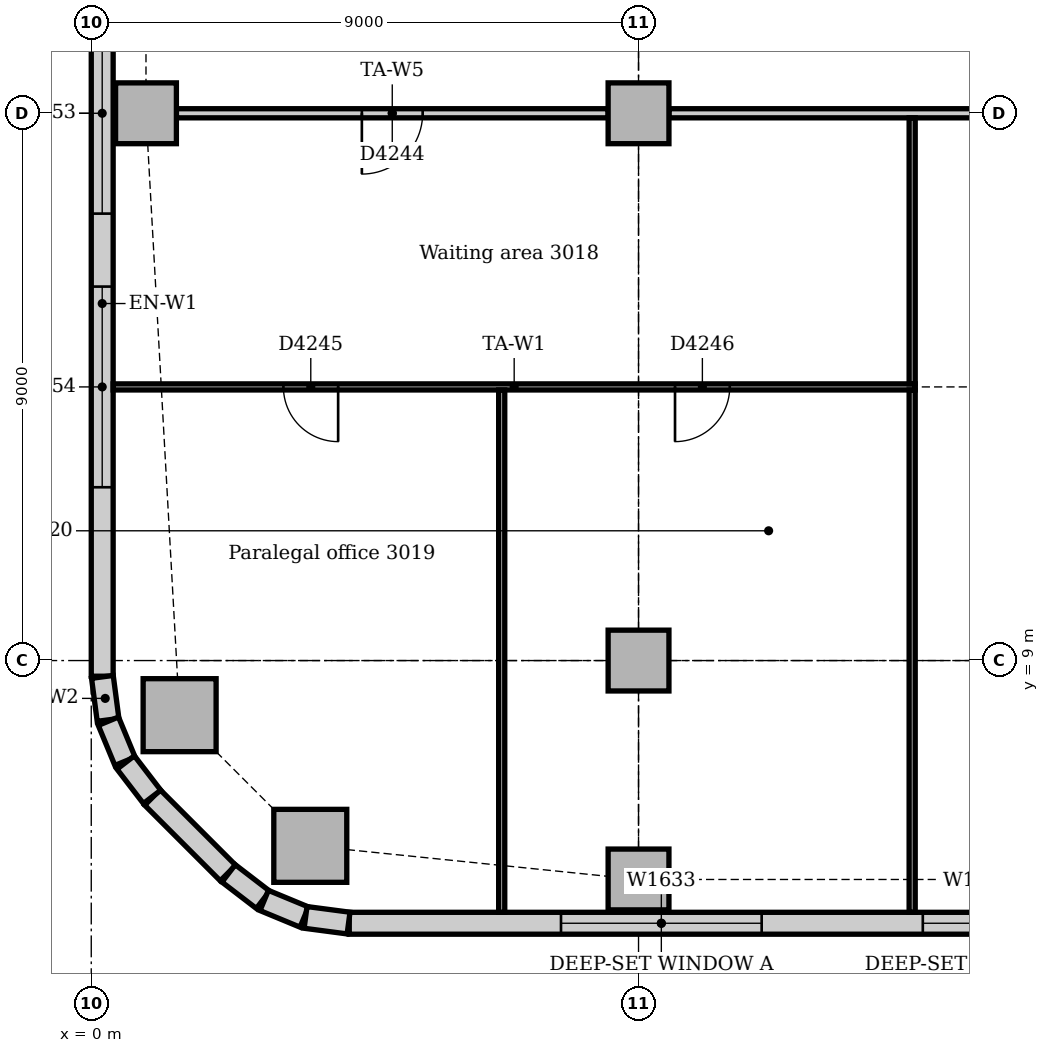
"""IFC4 building model, lengths in metres.
Left out: names, types, materials, properties, quantities, classifications, styles, units other than length and angle.
Written with IfcOpenShell. Run it as: python <this file> out.ifc"""

import sys

from ifc_helpers import new_model, si_unit, direction, frame, frame_2d, origin, origin_2d, place, context, subcontext, project, spatial, rectangle, extrude, element, fill, save


model = new_model("IFC4")
c1 = context("Model", 3, precision=1e-05, world=origin(), true_north=direction((0.0, 1.0)))
c2 = subcontext(c1, "Body", "Model", "MODEL_VIEW")
j1 = project(units=[si_unit("LENGTHUNIT", "METRE"), si_unit("PLANEANGLEUNIT", "RADIAN")], contexts=[c1])
p1 = place(None, origin())
s1 = spatial("IfcSite", under=j1, at=p1, CompositionType="ELEMENT")
p2 = place(p1, origin())
s2 = spatial("IfcBuilding", under=s1, at=p2, CompositionType="ELEMENT")
p3 = place(p2, frame((0.0, 0.0, 128.0)))
s3 = spatial("IfcBuildingStorey", under=s2, at=p3, CompositionType="ELEMENT", Elevation=128.0)
for number, where, z_axis, x_axis in (
    (1, (3.602, 5.953, 0.0), (0.0, 0.0, 1.0), (1.0, 0.0, 0.0)),
    (2, (1.453, 8.102, 0.0), (0.0, 0.0, 1.0), (1.0, 0.0, 0.0)),
):
    element("IfcColumn", number, at=place(p3, frame(where, z_axis=z_axis, x_axis=x_axis)), inside=s3, PredefinedType="COLUMN", context=c2, shape_type="SweptSolid", body=[
        extrude(rectangle(XDim=1.2, YDim=1.2, at=origin_2d()), origin(), (0.0, 0.0, 1.0), 3.85),
    ])
for number, where, z_axis, x_axis in (
    (3, (9.0, 5.4, 0.0), (0.0, 0.0, 1.0), (1.0, 0.0, 0.0)),
    (4, (0.9, 18.0, 0.0), (0.0, 0.0, 1.0), (1.0, 0.0, 0.0)),
    (5, (9.0, 9.0, 0.0), (0.0, 0.0, 1.0), (1.0, 0.0, 0.0)),
    (6, (9.0, 18.0, 0.0), (0.0, 0.0, 1.0), (1.0, 0.0, 0.0)),
):
    element("IfcColumn", number, at=place(p3, frame(where, z_axis=z_axis, x_axis=x_axis)), inside=s3, PredefinedType="COLUMN", context=c2, shape_type="SweptSolid", body=[
        extrude(rectangle(XDim=1.0, YDim=1.0, at=origin_2d()), origin(), (0.0, 0.0, 1.0), 3.85),
    ])
p4 = place(p3, frame((4.243, 4.68, 0.0), z_axis=(0.0, 0.0, 1.0), x_axis=(1.0, 0.0, 0.0)))
e7 = element("IfcWall", 7, at=p4, inside=s3, PredefinedType="STANDARD", context=c2, shape_type="SweptSolid", body=[
    extrude(rectangle(XDim=37.265, YDim=0.36, at=frame_2d((18.632, 0.0))), origin(), (0.0, 0.0, 1.0), 3.85),
])
p5 = place(p4, frame((3.482, 0.0, 0.9)))
e8 = element("IfcOpeningElement", 8, at=p5, cuts=e7, PredefinedType="OPENING", context=c2, shape_type="SweptSolid", body=[
    extrude(rectangle(XDim=3.3, YDim=1.6, at=frame_2d((1.65, 0.8))), frame((0.0, 0.19, 0.0), z_axis=(0.0, -1.0, 0.0), x_axis=(1.0, 0.0, 0.0)), (0.0, 0.0, 1.0), 0.38),
])
p6 = place(p4, frame((9.432, 0.0, 0.9)))
e9 = element("IfcOpeningElement", 9, at=p6, cuts=e7, PredefinedType="OPENING", context=c2, shape_type="SweptSolid", body=[
    extrude(rectangle(XDim=1.8, YDim=1.6, at=frame_2d((0.9, 0.8))), frame((0.0, 0.19, 0.0), z_axis=(0.0, -1.0, 0.0), x_axis=(1.0, 0.0, 0.0)), (0.0, 0.0, 1.0), 0.38),
])
p7 = place(p4, frame((12.482, 0.0, 0.9)))
e10 = element("IfcOpeningElement", 10, at=p7, cuts=e7, PredefinedType="OPENING", context=c2, shape_type="SweptSolid", body=[
    extrude(rectangle(XDim=3.3, YDim=1.6, at=frame_2d((1.65, 0.8))), frame((0.0, 0.19, 0.0), z_axis=(0.0, -1.0, 0.0), x_axis=(1.0, 0.0, 0.0)), (0.0, 0.0, 1.0), 0.38),
])
p8 = place(p4, frame((18.432, 0.0, 0.9)))
e11 = element("IfcOpeningElement", 11, at=p8, cuts=e7, PredefinedType="OPENING", context=c2, shape_type="SweptSolid", body=[
    extrude(rectangle(XDim=1.8, YDim=1.6, at=frame_2d((0.9, 0.8))), frame((0.0, 0.19, 0.0), z_axis=(0.0, -1.0, 0.0), x_axis=(1.0, 0.0, 0.0)), (0.0, 0.0, 1.0), 0.38),
])
p9 = place(p4, frame((21.482, 0.0, 0.9)))
e12 = element("IfcOpeningElement", 12, at=p9, cuts=e7, PredefinedType="OPENING", context=c2, shape_type="SweptSolid", body=[
    extrude(rectangle(XDim=3.3, YDim=1.6, at=frame_2d((1.65, 0.8))), frame((0.0, 0.19, 0.0), z_axis=(0.0, -1.0, 0.0), x_axis=(1.0, 0.0, 0.0)), (0.0, 0.0, 1.0), 0.38),
])
p10 = place(p4, frame((25.982, 0.0, 0.9)))
e13 = element("IfcOpeningElement", 13, at=p10, cuts=e7, PredefinedType="OPENING", context=c2, shape_type="SweptSolid", body=[
    extrude(rectangle(XDim=3.3, YDim=1.6, at=frame_2d((1.65, 0.8))), frame((0.0, 0.19, 0.0), z_axis=(0.0, -1.0, 0.0), x_axis=(1.0, 0.0, 0.0)), (0.0, 0.0, 1.0), 0.38),
])
p11 = place(p4, frame((30.482, 0.0, 0.9)))
e14 = element("IfcOpeningElement", 14, at=p11, cuts=e7, PredefinedType="OPENING", context=c2, shape_type="SweptSolid", body=[
    extrude(rectangle(XDim=3.3, YDim=1.6, at=frame_2d((1.65, 0.8))), frame((0.0, 0.19, 0.0), z_axis=(0.0, -1.0, 0.0), x_axis=(1.0, 0.0, 0.0)), (0.0, 0.0, 1.0), 0.38),
])
p12 = place(p3, frame((0.18, 21.0, 0.0), z_axis=(0.0, 0.0, 1.0), x_axis=(0.0, -1.0, 0.0)))
e15 = element("IfcWall", 15, at=p12, inside=s3, PredefinedType="STANDARD", context=c2, shape_type="SweptSolid", body=[
    extrude(rectangle(XDim=12.257, YDim=0.36, at=frame_2d((6.129, 0.0))), origin(), (0.0, 0.0, 1.0), 3.85),
])
p13 = place(p12, frame((1.35, 0.0, 0.9)))
e16 = element("IfcOpeningElement", 16, at=p13, cuts=e15, PredefinedType="OPENING", context=c2, shape_type="SweptSolid", body=[
    extrude(rectangle(XDim=3.3, YDim=1.6, at=frame_2d((1.65, 0.8))), frame((0.0, 0.19, 0.0), z_axis=(0.0, -1.0, 0.0), x_axis=(1.0, 0.0, 0.0)), (0.0, 0.0, 1.0), 0.38),
])
p14 = place(p12, frame((5.85, 0.0, 0.9)))
e17 = element("IfcOpeningElement", 17, at=p14, cuts=e15, PredefinedType="OPENING", context=c2, shape_type="SweptSolid", body=[
    extrude(rectangle(XDim=3.3, YDim=1.6, at=frame_2d((1.65, 0.8))), frame((0.0, 0.19, 0.0), z_axis=(0.0, -1.0, 0.0), x_axis=(1.0, 0.0, 0.0)), (0.0, 0.0, 1.0), 0.38),
])
p15 = place(p3, frame((1.006, 6.749, 0.0), z_axis=(0.0, 0.0, 1.0), x_axis=(0.707106781187, -0.707106781187, 0.0)))
e18 = element("IfcWall", 18, at=p15, inside=s3, PredefinedType="STANDARD", context=c2, shape_type="SweptSolid", body=[
    extrude(rectangle(XDim=1.757, YDim=0.36, at=frame_2d((0.879, 0.0))), origin(), (0.0, 0.0, 1.0), 3.85),
])
for number, where, z_axis, x_axis in (
    (19, (0.183, 8.731, 0.0), (0.0, 0.0, 1.0), (0.131, -0.991, 0.0)),
    (20, (0.282, 8.003, 0.0), (0.0, 0.0, 1.0), (0.383, -0.924, 0.0)),
):
    element("IfcWall", number, at=place(p3, frame(where, z_axis=z_axis, x_axis=x_axis)), inside=s3, PredefinedType="STANDARD", context=c2, shape_type="SweptSolid", body=[
        extrude(rectangle(XDim=0.713, YDim=0.36, at=frame_2d((0.356, 0.0))), origin(), (0.0, 0.0, 1.0), 3.85),
    ])
for number, where, z_axis, x_axis in (
    (21, (0.566, 7.324, 0.0), (0.0, 0.0, 1.0), (0.609, -0.793, 0.0)),
    (22, (2.259, 5.5, 0.0), (0.0, 0.0, 1.0), (0.793, -0.609, 0.0)),
):
    element("IfcWall", number, at=place(p3, frame(where, z_axis=z_axis, x_axis=x_axis)), inside=s3, PredefinedType="STANDARD", context=c2, shape_type="SweptSolid", body=[
        extrude(rectangle(XDim=0.713, YDim=0.36, at=frame_2d((0.357, 0.0))), origin(), (0.0, 0.0, 1.0), 3.85),
    ])
for number, where, z_axis, x_axis in (
    (23, (2.844, 5.055, 0.0), (0.0, 0.0, 1.0), (0.924, -0.383, 0.0)),
    (24, (3.524, 4.776, 0.0), (0.0, 0.0, 1.0), (0.991, -0.131, 0.0)),
):
    element("IfcWall", number, at=place(p3, frame(where, z_axis=z_axis, x_axis=x_axis)), inside=s3, PredefinedType="STANDARD", context=c2, shape_type="SweptSolid", body=[
        extrude(rectangle(XDim=0.713, YDim=0.36, at=frame_2d((0.356, 0.0))), origin(), (0.0, 0.0, 1.0), 3.85),
    ])
p16 = place(p3, frame((9.5, 18.0, 0.0), z_axis=(0.0, 0.0, 1.0), x_axis=(1.0, 0.0, 0.0)))
e25 = element("IfcWall", 25, at=p16, inside=s3, PredefinedType="PARTITIONING", context=c2, shape_type="SweptSolid", body=[
    extrude(rectangle(XDim=8.0, YDim=0.15, at=frame_2d((4.0, 0.0))), origin(), (0.0, 0.0, 1.0), 3.158),
])
p17 = place(p3, frame((1.4, 18.0, 0.0), z_axis=(0.0, 0.0, 1.0), x_axis=(1.0, 0.0, 0.0)))
e26 = element("IfcWall", 26, at=p17, inside=s3, PredefinedType="PARTITIONING", context=c2, shape_type="SweptSolid", body=[
    extrude(rectangle(XDim=7.1, YDim=0.15, at=frame_2d((3.55, 0.0))), origin(), (0.0, 0.0, 1.0), 3.158),
])
p18 = place(p17, frame((3.05, 0.0, 0.0)))
e27 = element("IfcOpeningElement", 27, at=p18, cuts=e26, PredefinedType="OPENING", context=c2, shape_type="SweptSolid", body=[
    extrude(rectangle(XDim=1.0, YDim=2.1, at=frame_2d((0.5, 1.05))), frame((0.0, 0.085, 0.0), z_axis=(0.0, -1.0, 0.0), x_axis=(1.0, 0.0, 0.0)), (0.0, 0.0, 1.0), 0.17),
])
p19 = place(p3, frame((0.36, 13.5, 0.0), z_axis=(0.0, 0.0, 1.0), x_axis=(1.0, 0.0, 0.0)))
e28 = element("IfcWall", 28, at=p19, inside=s3, PredefinedType="PARTITIONING", context=c2, shape_type="SweptSolid", body=[
    extrude(rectangle(XDim=13.19, YDim=0.1, at=frame_2d((6.595, 0.0))), origin(), (0.0, 0.0, 1.0), 3.354),
])
p20 = place(p19, frame((2.8, 0.0, 0.0)))
e29 = element("IfcOpeningElement", 29, at=p20, cuts=e28, PredefinedType="OPENING", context=c2, shape_type="SweptSolid", body=[
    extrude(rectangle(XDim=0.9, YDim=2.1, at=frame_2d((0.45, 1.05))), frame((0.0, 0.06, 0.0), z_axis=(0.0, -1.0, 0.0), x_axis=(1.0, 0.0, 0.0)), (0.0, 0.0, 1.0), 0.12),
])
p21 = place(p19, frame((9.24, 0.0, 0.0)))
e30 = element("IfcOpeningElement", 30, at=p21, cuts=e28, PredefinedType="OPENING", context=c2, shape_type="SweptSolid", body=[
    extrude(rectangle(XDim=0.9, YDim=2.1, at=frame_2d((0.45, 1.05))), frame((0.0, 0.06, 0.0), z_axis=(0.0, -1.0, 0.0), x_axis=(1.0, 0.0, 0.0)), (0.0, 0.0, 1.0), 0.12),
])
p22 = place(p3, frame((13.5, 13.55, 0.0), z_axis=(0.0, 0.0, 1.0), x_axis=(0.0, 1.0, 0.0)))
e31 = element("IfcWall", 31, at=p22, inside=s3, PredefinedType="PARTITIONING", context=c2, shape_type="SweptSolid", body=[
    extrude(rectangle(XDim=4.375, YDim=0.1, at=frame_2d((2.188, 0.0))), origin(), (0.0, 0.0, 1.0), 3.85),
])
for number, where, z_axis, x_axis in (
    (32, (13.5, 4.86, 0.0), (0.0, 0.0, 1.0), (0.0, 1.0, 0.0)),
    (33, (6.75, 4.86, 0.0), (0.0, 0.0, 1.0), (0.0, 1.0, 0.0)),
):
    element("IfcWall", number, at=place(p3, frame(where, z_axis=z_axis, x_axis=x_axis)), inside=s3, PredefinedType="PARTITIONING", context=c2, shape_type="SweptSolid", body=[
        extrude(rectangle(XDim=8.59, YDim=0.1, at=frame_2d((4.295, 0.0))), origin(), (0.0, 0.0, 1.0), 3.85),
    ])
p23 = place(p5, origin())
e34 = element("IfcWindow", 34, at=p23, inside=s3, PartitioningType="SINGLE_PANEL", PredefinedType="WINDOW", context=c2, shape_type="SweptSolid", body=[
    extrude(rectangle(XDim=3.3, YDim=1.6, at=frame_2d((1.65, 0.8))), frame((0.0, 0.13, 0.0), z_axis=(0.0, -1.0, 0.0), x_axis=(1.0, 0.0, 0.0)), (0.0, 0.0, 1.0), 0.06),
])
fill(e8, e34)
p24 = place(p6, origin())
e35 = element("IfcWindow", 35, at=p24, inside=s3, PartitioningType="SINGLE_PANEL", PredefinedType="WINDOW", context=c2, shape_type="SweptSolid", body=[
    extrude(rectangle(XDim=1.8, YDim=1.6, at=frame_2d((0.9, 0.8))), frame((0.0, 0.13, 0.0), z_axis=(0.0, -1.0, 0.0), x_axis=(1.0, 0.0, 0.0)), (0.0, 0.0, 1.0), 0.06),
])
fill(e9, e35)
p25 = place(p13, origin())
e36 = element("IfcWindow", 36, at=p25, inside=s3, PartitioningType="SINGLE_PANEL", PredefinedType="WINDOW", context=c2, shape_type="SweptSolid", body=[
    extrude(rectangle(XDim=3.3, YDim=1.6, at=frame_2d((1.65, 0.8))), frame((0.0, 0.13, 0.0), z_axis=(0.0, -1.0, 0.0), x_axis=(1.0, 0.0, 0.0)), (0.0, 0.0, 1.0), 0.06),
])
fill(e16, e36)
p26 = place(p14, origin())
e37 = element("IfcWindow", 37, at=p26, inside=s3, PartitioningType="SINGLE_PANEL", PredefinedType="WINDOW", context=c2, shape_type="SweptSolid", body=[
    extrude(rectangle(XDim=3.3, YDim=1.6, at=frame_2d((1.65, 0.8))), frame((0.0, 0.13, 0.0), z_axis=(0.0, -1.0, 0.0), x_axis=(1.0, 0.0, 0.0)), (0.0, 0.0, 1.0), 0.06),
])
fill(e17, e37)
p27 = place(p18, frame((1.0, 0.0, 0.0), z_axis=(0.0, 0.0, 1.0), x_axis=(-1.0, 0.0, 0.0)))
e38 = element("IfcDoor", 38, at=p27, inside=s3, OperationType="SINGLE_SWING_RIGHT", PredefinedType="DOOR", context=c2, shape_type="SweptSolid", body=[
    extrude(rectangle(XDim=1.0, YDim=2.1, at=frame_2d((0.5, 1.05))), frame((0.0, 0.025, 0.0), z_axis=(0.0, -1.0, 0.0), x_axis=(1.0, 0.0, 0.0)), (0.0, 0.0, 1.0), 0.05),
])
fill(e27, e38)
p28 = place(p20, frame((0.9, 0.0, 0.0), z_axis=(0.0, 0.0, 1.0), x_axis=(-1.0, 0.0, 0.0)))
e39 = element("IfcDoor", 39, at=p28, inside=s3, OperationType="SINGLE_SWING_LEFT", PredefinedType="DOOR", context=c2, shape_type="SweptSolid", body=[
    extrude(rectangle(XDim=0.9, YDim=2.1, at=frame_2d((0.45, 1.05))), frame((0.0, 0.025, 0.0), z_axis=(0.0, -1.0, 0.0), x_axis=(1.0, 0.0, 0.0)), (0.0, 0.0, 1.0), 0.05),
])
fill(e29, e39)
p29 = place(p21, frame((0.9, 0.0, 0.0), z_axis=(0.0, 0.0, 1.0), x_axis=(-1.0, 0.0, 0.0)))
e40 = element("IfcDoor", 40, at=p29, inside=s3, OperationType="SINGLE_SWING_RIGHT", PredefinedType="DOOR", context=c2, shape_type="SweptSolid", body=[
    extrude(rectangle(XDim=0.9, YDim=2.1, at=frame_2d((0.45, 1.05))), frame((0.0, 0.025, 0.0), z_axis=(0.0, -1.0, 0.0), x_axis=(1.0, 0.0, 0.0)), (0.0, 0.0, 1.0), 0.05),
])
fill(e30, e40)
save(model, sys.argv[1])
